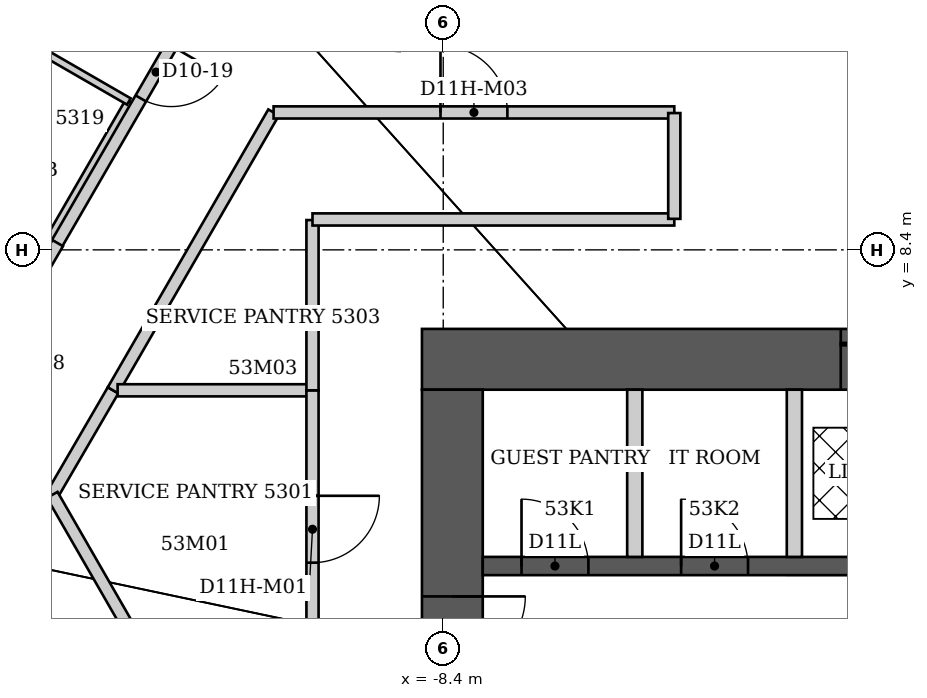
"""IFC4 building model, lengths in metres.
Left out: names, types, materials, properties, quantities, classifications, styles, units other than length and angle.
Written with IfcOpenShell. Run it as: python <this file> out.ifc"""

import sys

from ifc_helpers import new_model, si_unit, direction, frame, frame_2d, origin, place, context, subcontext, project, spatial, rectangle, extrude, element, fill, save


model = new_model("IFC4")
c1 = context("Model", 3, precision=1e-05, world=origin(), true_north=direction((0.0, 1.0)))
c2 = subcontext(c1, "Body", "Model", "MODEL_VIEW")
j1 = project(units=[si_unit("LENGTHUNIT", "METRE"), si_unit("PLANEANGLEUNIT", "RADIAN")], contexts=[c1])
p1 = place(None, origin())
s1 = spatial("IfcSite", under=j1, at=p1, CompositionType="ELEMENT")
p2 = place(p1, origin())
s2 = spatial("IfcBuilding", under=s1, at=p2, CompositionType="ELEMENT")
p3 = place(p2, frame((0.0, 0.0, 213.6)))
s3 = spatial("IfcBuildingStorey", under=s2, at=p3, CompositionType="ELEMENT", Elevation=213.6)
p4 = place(p3, frame((-8.75, 6.6, 0.0), z_axis=(0.0, 0.0, 1.0), x_axis=(1.0, 0.0, 0.0)))
e1 = element("IfcWall", 1, at=p4, inside=s3, PredefinedType="SHEAR", context=c2, shape_type="SweptSolid", body=[
    extrude(rectangle(XDim=17.5, YDim=1.0, at=frame_2d((8.75, 0.0))), origin(), (0.0, 0.0, 1.0), 3.8),
])
p5 = place(p4, frame((6.887, 0.0, 0.0)))
e2 = element("IfcOpeningElement", 2, at=p5, cuts=e1, PredefinedType="OPENING", context=c2, shape_type="SweptSolid", body=[
    extrude(rectangle(XDim=1.1, YDim=2.1, at=frame_2d((0.55, 1.05))), frame((0.0, 0.5, 0.0), z_axis=(0.0, -1.0, 0.0), x_axis=(1.0, 0.0, 0.0)), (0.0, 0.0, 1.0), 1.0),
])
p6 = place(p4, frame((9.512, 0.0, 0.0)))
e3 = element("IfcOpeningElement", 3, at=p6, cuts=e1, PredefinedType="OPENING", context=c2, shape_type="SweptSolid", body=[
    extrude(rectangle(XDim=1.1, YDim=2.1, at=frame_2d((0.55, 1.05))), frame((0.0, 0.5, 0.0), z_axis=(0.0, -1.0, 0.0), x_axis=(1.0, 0.0, 0.0)), (0.0, 0.0, 1.0), 1.0),
])
p7 = place(p4, frame((12.137, 0.0, 0.0)))
e4 = element("IfcOpeningElement", 4, at=p7, cuts=e1, PredefinedType="OPENING", context=c2, shape_type="SweptSolid", body=[
    extrude(rectangle(XDim=1.1, YDim=2.1, at=frame_2d((0.55, 1.05))), frame((0.0, 0.5, 0.0), z_axis=(0.0, -1.0, 0.0), x_axis=(1.0, 0.0, 0.0)), (0.0, 0.0, 1.0), 1.0),
])
p8 = place(p4, frame((14.762, 0.0, 0.0)))
e5 = element("IfcOpeningElement", 5, at=p8, cuts=e1, PredefinedType="OPENING", context=c2, shape_type="SweptSolid", body=[
    extrude(rectangle(XDim=1.1, YDim=2.1, at=frame_2d((0.55, 1.05))), frame((0.0, 0.5, 0.0), z_axis=(0.0, -1.0, 0.0), x_axis=(1.0, 0.0, 0.0)), (0.0, 0.0, 1.0), 1.0),
])
p9 = place(p3, frame((-8.25, -6.1, 0.0), z_axis=(0.0, 0.0, 1.0), x_axis=(0.0, 1.0, 0.0)))
e6 = element("IfcWall", 6, at=p9, inside=s3, PredefinedType="SHEAR", context=c2, shape_type="SweptSolid", body=[
    extrude(rectangle(XDim=12.2, YDim=1.0, at=frame_2d((6.1, 0.0))), origin(), (0.0, 0.0, 1.0), 3.8),
])
p10 = place(p9, frame((7.6, 0.0, 0.0)))
e7 = element("IfcOpeningElement", 7, at=p10, cuts=e6, PredefinedType="OPENING", context=c2, shape_type="SweptSolid", body=[
    extrude(rectangle(XDim=1.2, YDim=2.2, at=frame_2d((0.6, 1.1))), frame((0.0, 0.5, 0.0), z_axis=(0.0, -1.0, 0.0), x_axis=(1.0, 0.0, 0.0)), (0.0, 0.0, 1.0), 1.0),
])
p11 = place(p3, frame((-7.75, 3.2, 0.0), z_axis=(0.0, 0.0, 1.0), x_axis=(1.0, 0.0, 0.0)))
e8 = element("IfcWall", 8, at=p11, inside=s3, PredefinedType="SHEAR", context=c2, shape_type="SweptSolid", body=[
    extrude(rectangle(XDim=15.5, YDim=0.3, at=frame_2d((7.75, 0.0))), origin(), (0.0, 0.0, 1.0), 3.8),
])
p12 = place(p11, frame((0.637, 0.0, 0.0)))
e9 = element("IfcOpeningElement", 9, at=p12, cuts=e8, PredefinedType="OPENING", context=c2, shape_type="SweptSolid", body=[
    extrude(rectangle(XDim=1.1, YDim=2.2, at=frame_2d((0.55, 1.1))), frame((0.0, 0.15, 0.0), z_axis=(0.0, -1.0, 0.0), x_axis=(1.0, 0.0, 0.0)), (0.0, 0.0, 1.0), 0.3),
])
p13 = place(p11, frame((3.262, 0.0, 0.0)))
e10 = element("IfcOpeningElement", 10, at=p13, cuts=e8, PredefinedType="OPENING", context=c2, shape_type="SweptSolid", body=[
    extrude(rectangle(XDim=1.1, YDim=2.2, at=frame_2d((0.55, 1.1))), frame((0.0, 0.15, 0.0), z_axis=(0.0, -1.0, 0.0), x_axis=(1.0, 0.0, 0.0)), (0.0, 0.0, 1.0), 0.3),
])
for number, where, z_axis, x_axis in (
    (11, (-5.25, 3.35, 0.0), (0.0, 0.0, 1.0), (0.0, 1.0, 0.0)),
    (12, (-2.625, 3.35, 0.0), (0.0, 0.0, 1.0), (0.0, 1.0, 0.0)),
):
    element("IfcWall", number, at=place(p3, frame(where, z_axis=z_axis, x_axis=x_axis)), inside=s3, PredefinedType="PARTITIONING", context=c2, shape_type="SweptSolid", body=[
        extrude(rectangle(XDim=2.75, YDim=0.25, at=frame_2d((1.375, 0.0))), origin(), (0.0, 0.0, 1.0), 3.8),
    ])
p14 = place(p3, frame((-14.87, 8.59, 0.0), z_axis=(0.0, 0.0, 1.0), x_axis=(0.500291685314, 0.865856933682, 0.0)))
e13 = element("IfcWall", 13, at=p14, inside=s3, PredefinedType="PARTITIONING", context=c2, shape_type="SweptSolid", body=[
    extrude(rectangle(XDim=2.599, YDim=0.12, at=frame_2d((1.299, 0.0))), origin(), (0.0, 0.0, 1.0), 3.64),
])
p15 = place(p3, frame((-14.83, 4.37, 0.0), z_axis=(0.0, 0.0, 1.0), x_axis=(0.502626855825, 0.864503466623, 0.0)))
e14 = element("IfcWall", 14, at=p15, inside=s3, PredefinedType="PARTITIONING", context=c2, shape_type="SweptSolid", body=[
    extrude(rectangle(XDim=1.99, YDim=0.2, at=frame_2d((0.995, 0.0))), origin(), (0.0, 0.0, 1.0), 3.64),
])
p16 = place(p3, frame((-14.827, 8.554, 0.0), z_axis=(0.0, 0.0, 1.0), x_axis=(0.865865073245, -0.500277597875, 0.0)))
e15 = element("IfcWall", 15, at=p16, inside=s3, PredefinedType="PARTITIONING", context=c2, shape_type="SweptSolid", body=[
    extrude(rectangle(XDim=0.089, YDim=0.2, at=frame_2d((0.044, 0.0))), origin(), (0.0, 0.0, 1.0), 3.64),
])
p17 = place(p3, frame((-14.75, 8.51, 0.0), z_axis=(0.0, 0.0, 1.0), x_axis=(0.500618647881, 0.86566793252, 0.0)))
e16 = element("IfcWall", 16, at=p17, inside=s3, PredefinedType="PARTITIONING", context=c2, shape_type="SweptSolid", body=[
    extrude(rectangle(XDim=4.794, YDim=0.2, at=frame_2d((2.397, 0.0))), origin(), (0.0, 0.0, 1.0), 3.64),
])
p18 = place(p17, frame((2.75, 0.0, 0.0)))
e17 = element("IfcOpeningElement", 17, at=p18, cuts=e16, PredefinedType="OPENING", context=c2, shape_type="SweptSolid", body=[
    extrude(rectangle(XDim=1.0, YDim=2.13, at=frame_2d((0.5, 1.065))), frame((0.0, 0.1, 0.0), z_axis=(0.0, -1.0, 0.0), x_axis=(1.0, 0.0, 0.0)), (0.0, 0.0, 1.0), 0.2),
])
p19 = place(p3, frame((-14.74, 8.51, 0.0), z_axis=(0.0, 0.0, 1.0), x_axis=(-0.501513165407, -0.865150012959, 0.0)))
e18 = element("IfcWall", 18, at=p19, inside=s3, PredefinedType="PARTITIONING", context=c2, shape_type="SweptSolid", body=[
    extrude(rectangle(XDim=4.6, YDim=0.2, at=frame_2d((2.3, 0.0))), origin(), (0.0, 0.0, 1.0), 3.64),
])
p20 = place(p19, frame((1.8, 0.0, 0.0)))
e19 = element("IfcOpeningElement", 19, at=p20, cuts=e18, PredefinedType="OPENING", context=c2, shape_type="SweptSolid", body=[
    extrude(rectangle(XDim=1.0, YDim=2.13, at=frame_2d((0.5, 1.065))), frame((0.0, 0.1, 0.0), z_axis=(0.0, -1.0, 0.0), x_axis=(1.0, 0.0, 0.0)), (0.0, 0.0, 1.0), 0.2),
])
p21 = place(p3, frame((-13.83, 6.09, 0.0), z_axis=(0.0, 0.0, 1.0), x_axis=(0.500248310865, 0.865881993967, 0.0)))
e20 = element("IfcWall", 20, at=p21, inside=s3, PredefinedType="PARTITIONING", context=c2, shape_type="SweptSolid", body=[
    extrude(rectangle(XDim=5.278, YDim=0.2, at=frame_2d((2.639, 0.0))), origin(), (0.0, 0.0, 1.0), 3.64),
])
p22 = place(p3, frame((-13.755, 6.09, 0.0), z_axis=(0.0, 0.0, 1.0), x_axis=(1.0, 0.0, 0.0)))
e21 = element("IfcWall", 21, at=p22, inside=s3, PredefinedType="PARTITIONING", context=c2, shape_type="SweptSolid", body=[
    extrude(rectangle(XDim=3.195, YDim=0.2, at=frame_2d((1.597, 0.0))), origin(), (0.0, 0.0, 1.0), 3.64),
])
p23 = place(p3, frame((-13.57, 10.84, 0.0), z_axis=(0.0, 0.0, 1.0), x_axis=(-0.866177122335, 0.499737123639, 0.0)))
e22 = element("IfcWall", 22, at=p23, inside=s3, PredefinedType="PARTITIONING", context=c2, shape_type="SweptSolid", body=[
    extrude(rectangle(XDim=2.401, YDim=0.12, at=frame_2d((1.201, 0.0))), origin(), (0.0, 0.0, 1.0), 3.64),
])
p24 = place(p3, frame((-13.19, 1.52, 0.0), z_axis=(0.0, 0.0, 1.0), x_axis=(-0.498775186059, 0.866731396554, 0.0)))
e23 = element("IfcWall", 23, at=p24, inside=s3, PredefinedType="PARTITIONING", context=c2, shape_type="SweptSolid", body=[
    extrude(rectangle(XDim=3.288, YDim=0.2, at=frame_2d((1.644, 0.0))), origin(), (0.0, 0.0, 1.0), 3.64),
])
p25 = place(p3, frame((-11.19, 10.66, 0.0), z_axis=(0.0, 0.0, 1.0), x_axis=(1.0, 0.0, 0.0)))
e24 = element("IfcWall", 24, at=p25, inside=s3, PredefinedType="PARTITIONING", context=c2, shape_type="SweptSolid", body=[
    extrude(rectangle(XDim=6.59, YDim=0.2, at=frame_2d((3.295, 0.0))), origin(), (0.0, 0.0, 1.0), 3.64),
])
p26 = place(p25, frame((2.745, 0.0, 0.0)))
e25 = element("IfcOpeningElement", 25, at=p26, cuts=e24, PredefinedType="OPENING", context=c2, shape_type="SweptSolid", body=[
    extrude(rectangle(XDim=1.1, YDim=2.2, at=frame_2d((0.55, 1.1))), frame((0.0, 0.1, 0.0), z_axis=(0.0, -1.0, 0.0), x_axis=(1.0, 0.0, 0.0)), (0.0, 0.0, 1.0), 0.2),
])
p27 = place(p3, frame((-10.55, 6.09, 0.0), z_axis=(0.0, 0.0, 1.0), x_axis=(0.0, -1.0, 0.0)))
e26 = element("IfcWall", 26, at=p27, inside=s3, PredefinedType="PARTITIONING", context=c2, shape_type="SweptSolid", body=[
    extrude(rectangle(XDim=4.57, YDim=0.2, at=frame_2d((2.285, 0.0))), origin(), (0.0, 0.0, 1.0), 3.64),
])
p28 = place(p27, frame((1.735, 0.0, 0.0)))
e27 = element("IfcOpeningElement", 27, at=p28, cuts=e26, PredefinedType="OPENING", context=c2, shape_type="SweptSolid", body=[
    extrude(rectangle(XDim=1.1, YDim=2.2, at=frame_2d((0.55, 1.1))), frame((0.0, 0.1, 0.0), z_axis=(0.0, -1.0, 0.0), x_axis=(1.0, 0.0, 0.0)), (0.0, 0.0, 1.0), 0.2),
])
p29 = place(p3, frame((-10.55, 8.89, 0.0), z_axis=(0.0, 0.0, 1.0), x_axis=(0.0, -1.0, 0.0)))
e28 = element("IfcWall", 28, at=p29, inside=s3, PredefinedType="PARTITIONING", context=c2, shape_type="SweptSolid", body=[
    extrude(rectangle(XDim=2.8, YDim=0.2, at=frame_2d((1.4, 0.0))), origin(), (0.0, 0.0, 1.0), 3.64),
])
p30 = place(p3, frame((-4.6, 8.9, 0.0), z_axis=(0.0, 0.0, 1.0), x_axis=(-1.0, 0.0, 0.0)))
e29 = element("IfcWall", 29, at=p30, inside=s3, PredefinedType="PARTITIONING", context=c2, shape_type="SweptSolid", body=[
    extrude(rectangle(XDim=5.95, YDim=0.2, at=frame_2d((2.975, 0.0))), origin(), (0.0, 0.0, 1.0), 3.64),
])
p31 = place(p3, frame((-4.6, 10.65, 0.0), z_axis=(0.0, 0.0, 1.0), x_axis=(0.0, -1.0, 0.0)))
e30 = element("IfcWall", 30, at=p31, inside=s3, PredefinedType="PARTITIONING", context=c2, shape_type="SweptSolid", body=[
    extrude(rectangle(XDim=1.74, YDim=0.2, at=frame_2d((0.87, 0.0))), origin(), (0.0, 0.0, 1.0), 3.64),
])
p32 = place(p18, origin())
e31 = element("IfcDoor", 31, at=p32, inside=s3, OperationType="SINGLE_SWING_RIGHT", PredefinedType="DOOR", context=c2, shape_type="SweptSolid", body=[
    extrude(rectangle(XDim=1.0, YDim=2.13, at=frame_2d((0.5, 1.065))), frame((0.0, 0.025, 0.0), z_axis=(0.0, -1.0, 0.0), x_axis=(1.0, 0.0, 0.0)), (0.0, 0.0, 1.0), 0.05),
])
fill(e17, e31)
p33 = place(p28, origin())
e32 = element("IfcDoor", 32, at=p33, inside=s3, OperationType="SINGLE_SWING_LEFT", PredefinedType="DOOR", context=c2, shape_type="SweptSolid", body=[
    extrude(rectangle(XDim=1.1, YDim=2.2, at=frame_2d((0.55, 1.1))), frame((0.0, 0.025, 0.0), z_axis=(0.0, -1.0, 0.0), x_axis=(1.0, 0.0, 0.0)), (0.0, 0.0, 1.0), 0.05),
])
fill(e27, e32)
p34 = place(p26, origin())
e33 = element("IfcDoor", 33, at=p34, inside=s3, OperationType="SINGLE_SWING_LEFT", PredefinedType="DOOR", context=c2, shape_type="SweptSolid", body=[
    extrude(rectangle(XDim=1.1, YDim=2.2, at=frame_2d((0.55, 1.1))), frame((0.0, 0.025, 0.0), z_axis=(0.0, -1.0, 0.0), x_axis=(1.0, 0.0, 0.0)), (0.0, 0.0, 1.0), 0.05),
])
fill(e25, e33)
p35 = place(p10, origin())
e34 = element("IfcDoor", 34, at=p35, inside=s3, OperationType="SINGLE_SWING_RIGHT", PredefinedType="DOOR", context=c2, shape_type="SweptSolid", body=[
    extrude(rectangle(XDim=1.2, YDim=2.2, at=frame_2d((0.6, 1.1))), frame((0.0, 0.025, 0.0), z_axis=(0.0, -1.0, 0.0), x_axis=(1.0, 0.0, 0.0)), (0.0, 0.0, 1.0), 0.05),
])
fill(e7, e34)
p36 = place(p12, origin())
e35 = element("IfcDoor", 35, at=p36, inside=s3, OperationType="SINGLE_SWING_LEFT", PredefinedType="DOOR", context=c2, shape_type="SweptSolid", body=[
    extrude(rectangle(XDim=1.1, YDim=2.2, at=frame_2d((0.55, 1.1))), frame((0.0, 0.025, 0.0), z_axis=(0.0, -1.0, 0.0), x_axis=(1.0, 0.0, 0.0)), (0.0, 0.0, 1.0), 0.05),
])
fill(e9, e35)
p37 = place(p13, origin())
e36 = element("IfcDoor", 36, at=p37, inside=s3, OperationType="SINGLE_SWING_LEFT", PredefinedType="DOOR", context=c2, shape_type="SweptSolid", body=[
    extrude(rectangle(XDim=1.1, YDim=2.2, at=frame_2d((0.55, 1.1))), frame((0.0, 0.025, 0.0), z_axis=(0.0, -1.0, 0.0), x_axis=(1.0, 0.0, 0.0)), (0.0, 0.0, 1.0), 0.05),
])
fill(e10, e36)
p38 = place(p5, origin())
e37 = element("IfcDoor", 37, at=p38, inside=s3, OperationType="DOUBLE_DOOR_SLIDING", PredefinedType="DOOR", context=c2, shape_type="SweptSolid", body=[
    extrude(rectangle(XDim=1.1, YDim=2.1, at=frame_2d((0.55, 1.05))), frame((0.0, 0.025, 0.0), z_axis=(0.0, -1.0, 0.0), x_axis=(1.0, 0.0, 0.0)), (0.0, 0.0, 1.0), 0.05),
])
fill(e2, e37)
save(model, sys.argv[1])
